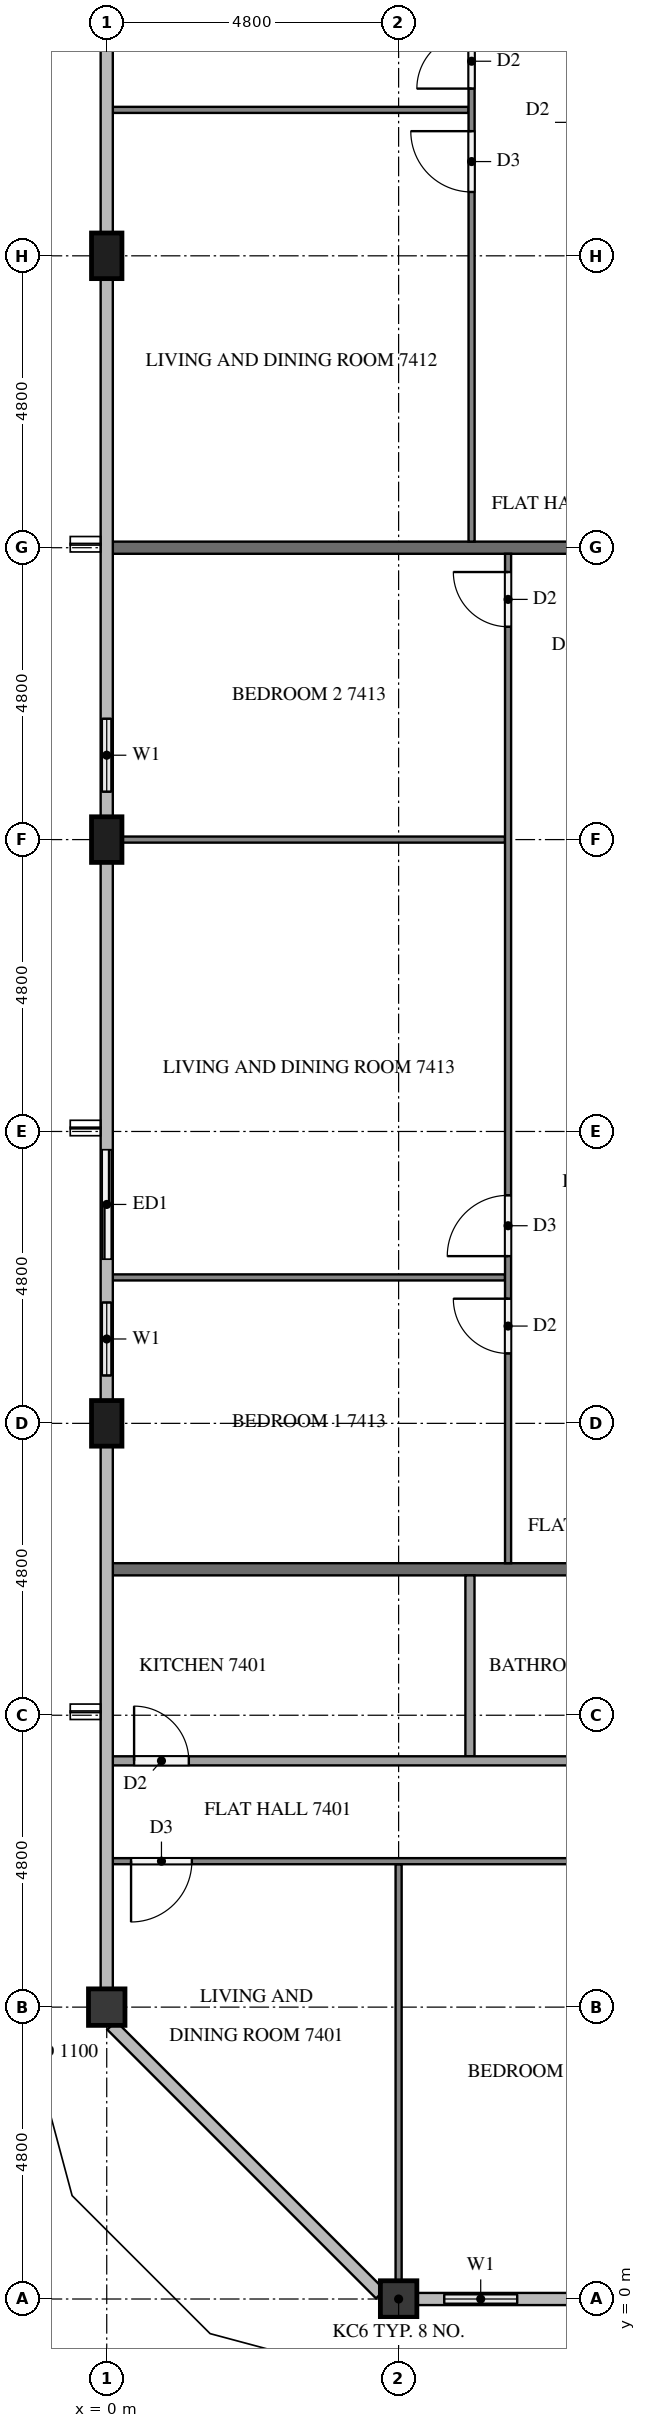
"""IFC4 building model, lengths in metres.
Left out: names, types, materials, properties, quantities, classifications, styles, units other than length and angle.
Written with IfcOpenShell. Run it as: python <this file> out.ifc"""

import sys

from ifc_helpers import new_model, si_unit, direction, frame, frame_2d, origin, origin_2d, place, context, subcontext, project, spatial, rectangle, extrude, element, fill, save


model = new_model("IFC4")
c1 = context("Model", 3, precision=1e-05, world=origin(), true_north=direction((0.0, 1.0)))
c2 = subcontext(c1, "Body", "Model", "MODEL_VIEW")
j1 = project(units=[si_unit("LENGTHUNIT", "METRE"), si_unit("PLANEANGLEUNIT", "RADIAN")], contexts=[c1])
p1 = place(None, origin())
s1 = spatial("IfcSite", under=j1, at=p1, CompositionType="ELEMENT")
p2 = place(p1, origin())
s2 = spatial("IfcBuilding", under=s1, at=p2, CompositionType="ELEMENT")
p3 = place(p2, frame((0.0, 0.0, 282.6)))
s3 = spatial("IfcBuildingStorey", under=s2, at=p3, CompositionType="ELEMENT", Elevation=282.6)
p4 = place(p3, frame((4.8, 0.0, 0.0), z_axis=(0.0, 0.0, 1.0), x_axis=(1.0, 0.0, 0.0)))
e1 = element("IfcColumn", 1, at=p4, inside=s3, PredefinedType="COLUMN", context=c2, shape_type="SweptSolid", body=[
    extrude(rectangle(XDim=0.6, YDim=0.6, at=origin_2d()), origin(), (0.0, 0.0, 1.0), 3.2),
])
for number, where, z_axis, x_axis in (
    (2, (0.0, 33.6, 0.0), (0.0, 0.0, 1.0), (0.0, 1.0, 0.0)),
    (3, (0.0, 24.0, 0.0), (0.0, 0.0, 1.0), (0.0, 1.0, 0.0)),
    (4, (0.0, 14.4, 0.0), (0.0, 0.0, 1.0), (0.0, 1.0, 0.0)),
):
    element("IfcColumn", number, at=place(p3, frame(where, z_axis=z_axis, x_axis=x_axis)), inside=s3, PredefinedType="COLUMN", context=c2, shape_type="SweptSolid", body=[
        extrude(rectangle(XDim=0.75, YDim=0.5, at=origin_2d()), origin(), (0.0, 0.0, 1.0), 3.2),
    ])
p5 = place(p3, frame((0.0, 4.8, 0.0), z_axis=(0.0, 0.0, 1.0), x_axis=(1.0, 0.0, 0.0)))
e5 = element("IfcColumn", 5, at=p5, inside=s3, PredefinedType="COLUMN", context=c2, shape_type="SweptSolid", body=[
    extrude(rectangle(XDim=0.6, YDim=0.6, at=origin_2d()), origin(), (0.0, 0.0, 1.0), 3.2),
])
p6 = place(p3, frame((5.1, 0.0, 0.0), z_axis=(0.0, 0.0, 1.0), x_axis=(1.0, 0.0, 0.0)))
e6 = element("IfcWall", 6, at=p6, inside=s3, PredefinedType="SOLIDWALL", context=c2, shape_type="SweptSolid", body=[
    extrude(rectangle(XDim=2.1, YDim=0.15, at=frame_2d((1.05, 0.0))), origin(), (0.0, 0.0, 1.0), 3.2),
])
p7 = place(p6, frame((0.45, 0.0, 0.9)))
e7 = element("IfcOpeningElement", 7, at=p7, cuts=e6, PredefinedType="OPENING", context=c2, shape_type="SweptSolid", body=[
    extrude(rectangle(XDim=1.2, YDim=1.4, at=frame_2d((0.6, 0.7))), frame((0.0, 0.085, 0.0), z_axis=(0.0, -1.0, 0.0), x_axis=(1.0, 0.0, 0.0)), (0.0, 0.0, 1.0), 0.17),
])
p8 = place(p3, frame((0.0, 26.4, 0.0), z_axis=(0.0, 0.0, 1.0), x_axis=(0.0, -1.0, 0.0)))
e8 = element("IfcWall", 8, at=p8, inside=s3, PredefinedType="SOLIDWALL", context=c2, shape_type="SweptSolid", body=[
    extrude(rectangle(XDim=2.025, YDim=0.15, at=frame_2d((1.012, 0.0))), origin(), (0.0, 0.0, 1.0), 3.2),
])
p9 = place(p8, frame((0.413, 0.0, 0.9)))
e9 = element("IfcOpeningElement", 9, at=p9, cuts=e8, PredefinedType="OPENING", context=c2, shape_type="SweptSolid", body=[
    extrude(rectangle(XDim=1.2, YDim=1.4, at=frame_2d((0.6, 0.7))), frame((0.0, 0.085, 0.0), z_axis=(0.0, -1.0, 0.0), x_axis=(1.0, 0.0, 0.0)), (0.0, 0.0, 1.0), 0.17),
])
p10 = place(p3, frame((0.0, 19.2, 0.0), z_axis=(0.0, 0.0, 1.0), x_axis=(0.0, -1.0, 0.0)))
e10 = element("IfcWall", 10, at=p10, inside=s3, PredefinedType="SOLIDWALL", context=c2, shape_type="SweptSolid", body=[
    extrude(rectangle(XDim=4.425, YDim=0.15, at=frame_2d((2.212, 0.0))), origin(), (0.0, 0.0, 1.0), 3.2),
])
p11 = place(p10, frame((0.3, 0.0, 0.0)))
e11 = element("IfcOpeningElement", 11, at=p11, cuts=e10, PredefinedType="OPENING", context=c2, shape_type="SweptSolid", body=[
    extrude(rectangle(XDim=1.8, YDim=2.4, at=frame_2d((0.9, 1.2))), frame((0.0, 0.085, 0.0), z_axis=(0.0, -1.0, 0.0), x_axis=(1.0, 0.0, 0.0)), (0.0, 0.0, 1.0), 0.17),
])
p12 = place(p10, frame((2.812, 0.0, 0.9)))
e12 = element("IfcOpeningElement", 12, at=p12, cuts=e10, PredefinedType="OPENING", context=c2, shape_type="SweptSolid", body=[
    extrude(rectangle(XDim=1.2, YDim=1.4, at=frame_2d((0.6, 0.7))), frame((0.0, 0.085, 0.0), z_axis=(0.0, -1.0, 0.0), x_axis=(1.0, 0.0, 0.0)), (0.0, 0.0, 1.0), 0.17),
])
for number, where, z_axis, x_axis in (
    (13, (0.1, 12.0, 0.0), (0.0, 0.0, 1.0), (1.0, 0.0, 0.0)),
    (14, (0.1, 28.8, 0.0), (0.0, 0.0, 1.0), (1.0, 0.0, 0.0)),
):
    element("IfcWall", number, at=place(p3, frame(where, z_axis=z_axis, x_axis=x_axis)), inside=s3, PredefinedType="PARTITIONING", context=c2, shape_type="SweptSolid", body=[
        extrude(rectangle(XDim=11.8, YDim=0.2, at=frame_2d((5.9, 0.0))), origin(), (0.0, 0.0, 1.0), 3.2),
    ])
p13 = place(p3, frame((4.8, 7.15, 0.0), z_axis=(0.0, 0.0, 1.0), x_axis=(0.0, -1.0, 0.0)))
e15 = element("IfcWall", 15, at=p13, inside=s3, PredefinedType="PARTITIONING", context=c2, shape_type="SweptSolid", body=[
    extrude(rectangle(XDim=6.85, YDim=0.1, at=frame_2d((3.425, 0.0))), origin(), (0.0, 0.0, 1.0), 3.2),
])
p14 = place(p3, frame((14.3, 7.2, 0.0), z_axis=(0.0, 0.0, 1.0), x_axis=(-1.0, 0.0, 0.0)))
e16 = element("IfcWall", 16, at=p14, inside=s3, PredefinedType="PARTITIONING", context=c2, shape_type="SweptSolid", body=[
    extrude(rectangle(XDim=14.2, YDim=0.1, at=frame_2d((7.1, 0.0))), origin(), (0.0, 0.0, 1.0), 3.2),
])
p15 = place(p14, frame((3.45, 0.0, 0.0)))
e17 = element("IfcOpeningElement", 17, at=p15, cuts=e16, PredefinedType="OPENING", context=c2, shape_type="SweptSolid", body=[
    extrude(rectangle(XDim=0.9, YDim=2.1, at=frame_2d((0.45, 1.05))), frame((0.0, 0.06, 0.0), z_axis=(0.0, -1.0, 0.0), x_axis=(1.0, 0.0, 0.0)), (0.0, 0.0, 1.0), 0.12),
])
p16 = place(p14, frame((5.05, 0.0, 0.0)))
e18 = element("IfcOpeningElement", 18, at=p16, cuts=e16, PredefinedType="OPENING", context=c2, shape_type="SweptSolid", body=[
    extrude(rectangle(XDim=0.9, YDim=2.1, at=frame_2d((0.45, 1.05))), frame((0.0, 0.06, 0.0), z_axis=(0.0, -1.0, 0.0), x_axis=(1.0, 0.0, 0.0)), (0.0, 0.0, 1.0), 0.12),
])
p17 = place(p14, frame((12.9, 0.0, 0.0)))
e19 = element("IfcOpeningElement", 19, at=p17, cuts=e16, PredefinedType="OPENING", context=c2, shape_type="SweptSolid", body=[
    extrude(rectangle(XDim=1.0, YDim=2.1, at=frame_2d((0.5, 1.05))), frame((0.0, 0.06, 0.0), z_axis=(0.0, -1.0, 0.0), x_axis=(1.0, 0.0, 0.0)), (0.0, 0.0, 1.0), 0.12),
])
p18 = place(p3, frame((5.973, 11.9, 0.0), z_axis=(0.0, 0.0, 1.0), x_axis=(0.0, -1.0, 0.0)))
e20 = element("IfcWall", 20, at=p18, inside=s3, PredefinedType="PARTITIONING", context=c2, shape_type="SweptSolid", body=[
    extrude(rectangle(XDim=2.975, YDim=0.15, at=frame_2d((1.487, 0.0))), origin(), (0.0, 0.0, 1.0), 3.2),
])
p19 = place(p3, frame((0.1, 8.85, 0.0), z_axis=(0.0, 0.0, 1.0), x_axis=(1.0, 0.0, 0.0)))
e21 = element("IfcWall", 21, at=p19, inside=s3, PredefinedType="PARTITIONING", context=c2, shape_type="SweptSolid", body=[
    extrude(rectangle(XDim=12.725, YDim=0.15, at=frame_2d((6.362, 0.0))), origin(), (0.0, 0.0, 1.0), 3.2),
])
p20 = place(p19, frame((10.114, 0.0, 0.0)))
e22 = element("IfcOpeningElement", 22, at=p20, cuts=e21, PredefinedType="OPENING", context=c2, shape_type="SweptSolid", body=[
    extrude(rectangle(XDim=0.8, YDim=2.1, at=frame_2d((0.4, 1.05))), frame((0.0, 0.085, 0.0), z_axis=(0.0, -1.0, 0.0), x_axis=(1.0, 0.0, 0.0)), (0.0, 0.0, 1.0), 0.17),
])
p21 = place(p19, frame((8.563, 0.0, 0.0)))
e23 = element("IfcOpeningElement", 23, at=p21, cuts=e21, PredefinedType="OPENING", context=c2, shape_type="SweptSolid", body=[
    extrude(rectangle(XDim=0.9, YDim=2.1, at=frame_2d((0.45, 1.05))), frame((0.0, 0.085, 0.0), z_axis=(0.0, -1.0, 0.0), x_axis=(1.0, 0.0, 0.0)), (0.0, 0.0, 1.0), 0.17),
])
p22 = place(p19, frame((0.35, 0.0, 0.0)))
e24 = element("IfcOpeningElement", 24, at=p22, cuts=e21, PredefinedType="OPENING", context=c2, shape_type="SweptSolid", body=[
    extrude(rectangle(XDim=0.9, YDim=2.1, at=frame_2d((0.45, 1.05))), frame((0.0, 0.085, 0.0), z_axis=(0.0, -1.0, 0.0), x_axis=(1.0, 0.0, 0.0)), (0.0, 0.0, 1.0), 0.17),
])
p23 = place(p3, frame((5.95, 36.0, 0.0), z_axis=(0.0, 0.0, 1.0), x_axis=(-1.0, 0.0, 0.0)))
e25 = element("IfcWall", 25, at=p23, inside=s3, PredefinedType="PARTITIONING", context=c2, shape_type="SweptSolid", body=[
    extrude(rectangle(XDim=5.85, YDim=0.1, at=frame_2d((2.925, 0.0))), origin(), (0.0, 0.0, 1.0), 3.2),
])
p24 = place(p3, frame((6.0, 28.9, 0.0), z_axis=(0.0, 0.0, 1.0), x_axis=(0.0, 1.0, 0.0)))
e26 = element("IfcWall", 26, at=p24, inside=s3, PredefinedType="PARTITIONING", context=c2, shape_type="SweptSolid", body=[
    extrude(rectangle(XDim=11.8, YDim=0.1, at=frame_2d((5.9, 0.0))), origin(), (0.0, 0.0, 1.0), 3.2),
])
p25 = place(p24, frame((5.75, 0.0, 0.0)))
e27 = element("IfcOpeningElement", 27, at=p25, cuts=e26, PredefinedType="OPENING", context=c2, shape_type="SweptSolid", body=[
    extrude(rectangle(XDim=1.0, YDim=2.1, at=frame_2d((0.5, 1.05))), frame((0.0, 0.06, 0.0), z_axis=(0.0, -1.0, 0.0), x_axis=(1.0, 0.0, 0.0)), (0.0, 0.0, 1.0), 0.12),
])
p26 = place(p24, frame((7.45, 0.0, 0.0)))
e28 = element("IfcOpeningElement", 28, at=p26, cuts=e26, PredefinedType="OPENING", context=c2, shape_type="SweptSolid", body=[
    extrude(rectangle(XDim=0.9, YDim=2.1, at=frame_2d((0.45, 1.05))), frame((0.0, 0.06, 0.0), z_axis=(0.0, -1.0, 0.0), x_axis=(1.0, 0.0, 0.0)), (0.0, 0.0, 1.0), 0.12),
])
p27 = place(p3, frame((6.55, 16.8, 0.0), z_axis=(0.0, 0.0, 1.0), x_axis=(-1.0, 0.0, 0.0)))
e29 = element("IfcWall", 29, at=p27, inside=s3, PredefinedType="PARTITIONING", context=c2, shape_type="SweptSolid", body=[
    extrude(rectangle(XDim=6.45, YDim=0.1, at=frame_2d((3.225, 0.0))), origin(), (0.0, 0.0, 1.0), 3.2),
])
p28 = place(p3, frame((6.55, 24.0, 0.0), z_axis=(0.0, 0.0, 1.0), x_axis=(-1.0, 0.0, 0.0)))
e30 = element("IfcWall", 30, at=p28, inside=s3, PredefinedType="PARTITIONING", context=c2, shape_type="SweptSolid", body=[
    extrude(rectangle(XDim=6.3, YDim=0.1, at=frame_2d((3.15, 0.0))), origin(), (0.0, 0.0, 1.0), 3.2),
])
p29 = place(p3, frame((6.6, 12.1, 0.0), z_axis=(0.0, 0.0, 1.0), x_axis=(0.0, 1.0, 0.0)))
e31 = element("IfcWall", 31, at=p29, inside=s3, PredefinedType="PARTITIONING", context=c2, shape_type="SweptSolid", body=[
    extrude(rectangle(XDim=16.6, YDim=0.1, at=frame_2d((8.3, 0.0))), origin(), (0.0, 0.0, 1.0), 3.2),
])
p30 = place(p29, frame((3.45, 0.0, 0.0)))
e32 = element("IfcOpeningElement", 32, at=p30, cuts=e31, PredefinedType="OPENING", context=c2, shape_type="SweptSolid", body=[
    extrude(rectangle(XDim=0.9, YDim=2.1, at=frame_2d((0.45, 1.05))), frame((0.0, 0.06, 0.0), z_axis=(0.0, -1.0, 0.0), x_axis=(1.0, 0.0, 0.0)), (0.0, 0.0, 1.0), 0.12),
])
p31 = place(p29, frame((5.05, 0.0, 0.0)))
e33 = element("IfcOpeningElement", 33, at=p31, cuts=e31, PredefinedType="OPENING", context=c2, shape_type="SweptSolid", body=[
    extrude(rectangle(XDim=1.0, YDim=2.1, at=frame_2d((0.5, 1.05))), frame((0.0, 0.06, 0.0), z_axis=(0.0, -1.0, 0.0), x_axis=(1.0, 0.0, 0.0)), (0.0, 0.0, 1.0), 0.12),
])
p32 = place(p29, frame((15.4, 0.0, 0.0)))
e34 = element("IfcOpeningElement", 34, at=p32, cuts=e31, PredefinedType="OPENING", context=c2, shape_type="SweptSolid", body=[
    extrude(rectangle(XDim=0.9, YDim=2.1, at=frame_2d((0.45, 1.05))), frame((0.0, 0.06, 0.0), z_axis=(0.0, -1.0, 0.0), x_axis=(1.0, 0.0, 0.0)), (0.0, 0.0, 1.0), 0.12),
])
p33 = place(p7, origin())
e35 = element("IfcWindow", 35, at=p33, inside=s3, PartitioningType="SINGLE_PANEL", PredefinedType="WINDOW", context=c2, shape_type="SweptSolid", body=[
    extrude(rectangle(XDim=1.2, YDim=1.4, at=frame_2d((0.6, 0.7))), frame((0.0, 0.03, 0.0), z_axis=(0.0, -1.0, 0.0), x_axis=(1.0, 0.0, 0.0)), (0.0, 0.0, 1.0), 0.06),
])
fill(e7, e35)
p34 = place(p9, origin())
e36 = element("IfcWindow", 36, at=p34, inside=s3, PartitioningType="SINGLE_PANEL", PredefinedType="WINDOW", context=c2, shape_type="SweptSolid", body=[
    extrude(rectangle(XDim=1.2, YDim=1.4, at=frame_2d((0.6, 0.7))), frame((0.0, 0.03, 0.0), z_axis=(0.0, -1.0, 0.0), x_axis=(1.0, 0.0, 0.0)), (0.0, 0.0, 1.0), 0.06),
])
fill(e9, e36)
p35 = place(p11, origin())
e37 = element("IfcDoor", 37, at=p35, inside=s3, OperationType="SLIDING_TO_LEFT", PredefinedType="DOOR", context=c2, shape_type="SweptSolid", body=[
    extrude(rectangle(XDim=1.8, YDim=2.4, at=frame_2d((0.9, 1.2))), frame((0.0, 0.025, 0.0), z_axis=(0.0, -1.0, 0.0), x_axis=(1.0, 0.0, 0.0)), (0.0, 0.0, 1.0), 0.05),
])
fill(e11, e37)
p36 = place(p12, origin())
e38 = element("IfcWindow", 38, at=p36, inside=s3, PartitioningType="SINGLE_PANEL", PredefinedType="WINDOW", context=c2, shape_type="SweptSolid", body=[
    extrude(rectangle(XDim=1.2, YDim=1.4, at=frame_2d((0.6, 0.7))), frame((0.0, 0.03, 0.0), z_axis=(0.0, -1.0, 0.0), x_axis=(1.0, 0.0, 0.0)), (0.0, 0.0, 1.0), 0.06),
])
fill(e12, e38)
p37 = place(p17, origin())
e39 = element("IfcDoor", 39, at=p37, inside=s3, OperationType="SINGLE_SWING_RIGHT", PredefinedType="DOOR", context=c2, shape_type="SweptSolid", body=[
    extrude(rectangle(XDim=1.0, YDim=2.1, at=frame_2d((0.5, 1.05))), frame((0.0, 0.025, 0.0), z_axis=(0.0, -1.0, 0.0), x_axis=(1.0, 0.0, 0.0)), (0.0, 0.0, 1.0), 0.05),
])
fill(e19, e39)
p38 = place(p22, origin())
e40 = element("IfcDoor", 40, at=p38, inside=s3, OperationType="SINGLE_SWING_LEFT", PredefinedType="DOOR", context=c2, shape_type="SweptSolid", body=[
    extrude(rectangle(XDim=0.9, YDim=2.1, at=frame_2d((0.45, 1.05))), frame((0.0, 0.025, 0.0), z_axis=(0.0, -1.0, 0.0), x_axis=(1.0, 0.0, 0.0)), (0.0, 0.0, 1.0), 0.05),
])
fill(e24, e40)
p39 = place(p25, origin())
e41 = element("IfcDoor", 41, at=p39, inside=s3, OperationType="SINGLE_SWING_RIGHT", PredefinedType="DOOR", context=c2, shape_type="SweptSolid", body=[
    extrude(rectangle(XDim=1.0, YDim=2.1, at=frame_2d((0.5, 1.05))), frame((0.0, 0.025, 0.0), z_axis=(0.0, -1.0, 0.0), x_axis=(1.0, 0.0, 0.0)), (0.0, 0.0, 1.0), 0.05),
])
fill(e27, e41)
p40 = place(p26, origin())
e42 = element("IfcDoor", 42, at=p40, inside=s3, OperationType="SINGLE_SWING_LEFT", PredefinedType="DOOR", context=c2, shape_type="SweptSolid", body=[
    extrude(rectangle(XDim=0.9, YDim=2.1, at=frame_2d((0.45, 1.05))), frame((0.0, 0.025, 0.0), z_axis=(0.0, -1.0, 0.0), x_axis=(1.0, 0.0, 0.0)), (0.0, 0.0, 1.0), 0.05),
])
fill(e28, e42)
p41 = place(p30, origin())
e43 = element("IfcDoor", 43, at=p41, inside=s3, OperationType="SINGLE_SWING_RIGHT", PredefinedType="DOOR", context=c2, shape_type="SweptSolid", body=[
    extrude(rectangle(XDim=0.9, YDim=2.1, at=frame_2d((0.45, 1.05))), frame((0.0, 0.025, 0.0), z_axis=(0.0, -1.0, 0.0), x_axis=(1.0, 0.0, 0.0)), (0.0, 0.0, 1.0), 0.05),
])
fill(e32, e43)
p42 = place(p31, origin())
e44 = element("IfcDoor", 44, at=p42, inside=s3, OperationType="SINGLE_SWING_LEFT", PredefinedType="DOOR", context=c2, shape_type="SweptSolid", body=[
    extrude(rectangle(XDim=1.0, YDim=2.1, at=frame_2d((0.5, 1.05))), frame((0.0, 0.025, 0.0), z_axis=(0.0, -1.0, 0.0), x_axis=(1.0, 0.0, 0.0)), (0.0, 0.0, 1.0), 0.05),
])
fill(e33, e44)
p43 = place(p32, origin())
e45 = element("IfcDoor", 45, at=p43, inside=s3, OperationType="SINGLE_SWING_RIGHT", PredefinedType="DOOR", context=c2, shape_type="SweptSolid", body=[
    extrude(rectangle(XDim=0.9, YDim=2.1, at=frame_2d((0.45, 1.05))), frame((0.0, 0.025, 0.0), z_axis=(0.0, -1.0, 0.0), x_axis=(1.0, 0.0, 0.0)), (0.0, 0.0, 1.0), 0.05),
])
fill(e34, e45)
save(model, sys.argv[1])
